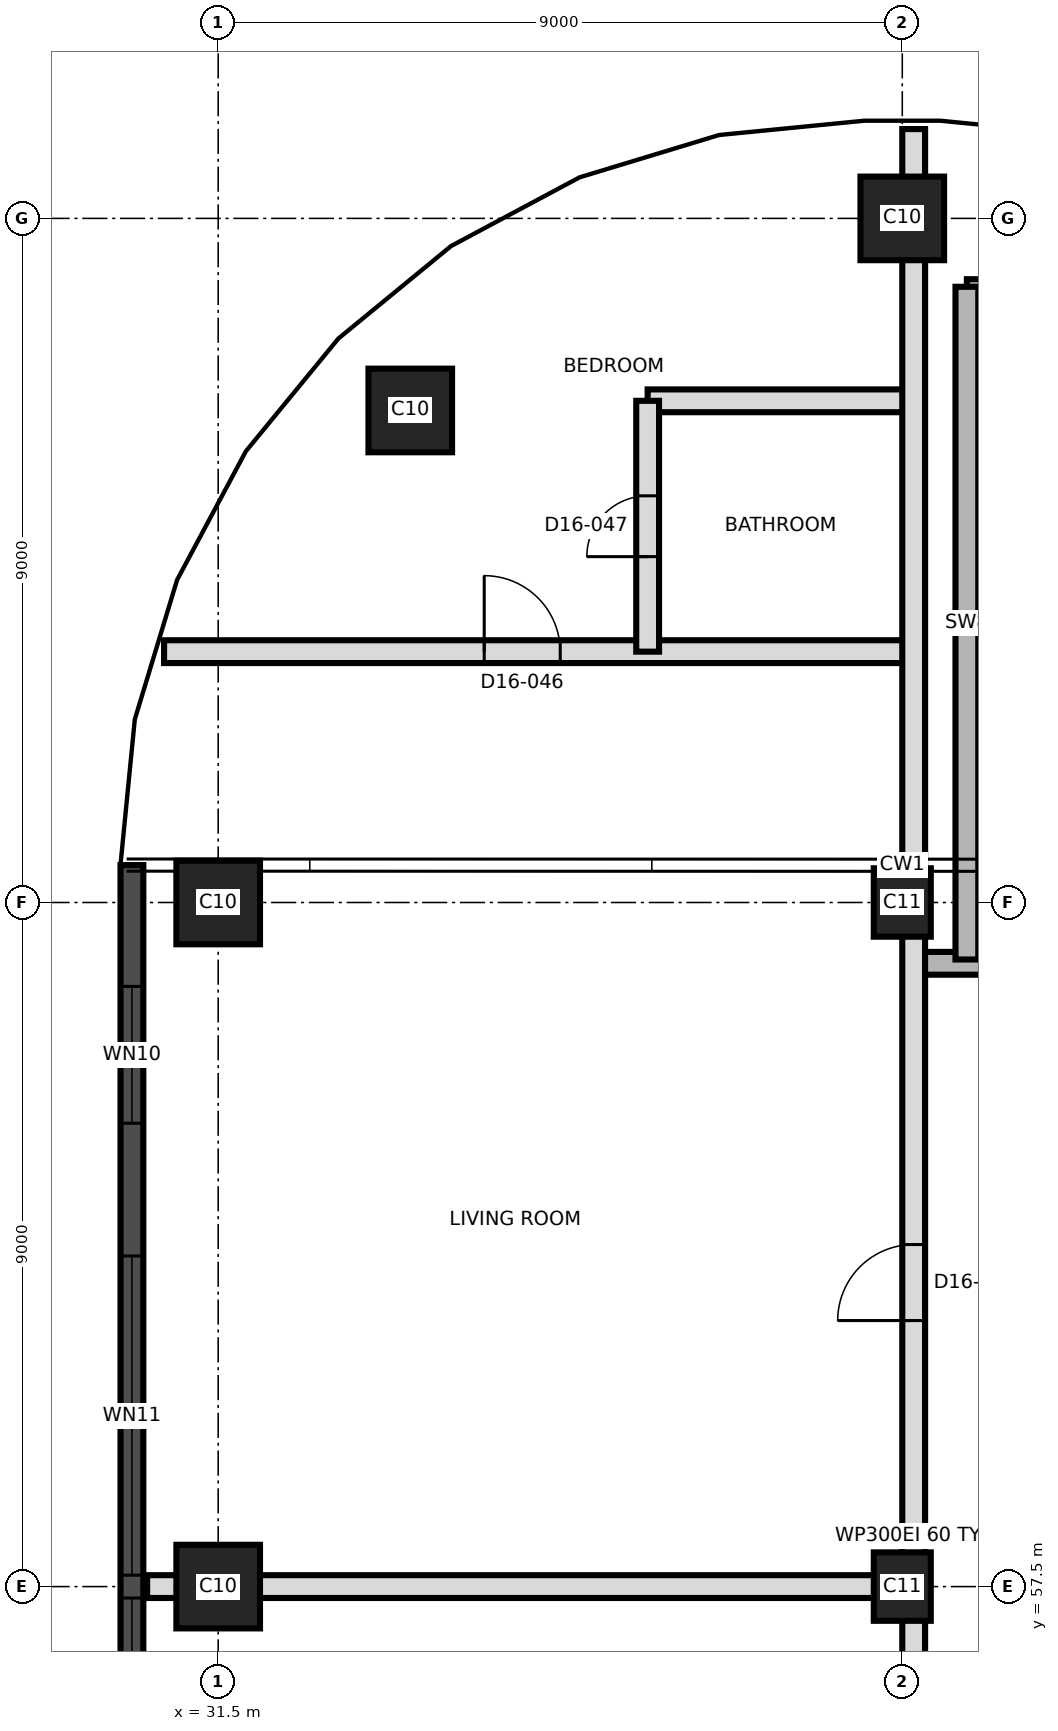
"""IFC4 building model, lengths in metres.
Left out: names, types, materials, properties, quantities, classifications, styles, units other than length and angle.
Written with IfcOpenShell. Run it as: python <this file> out.ifc"""

import sys

from ifc_helpers import new_model, si_unit, direction, frame, frame_2d, origin, origin_2d, place, context, subcontext, project, spatial, rectangle, extrude, element, fill, save


model = new_model("IFC4")
c1 = context("Model", 3, precision=1e-05, world=origin(), true_north=direction((0.0, 1.0)))
c2 = subcontext(c1, "Body", "Model", "MODEL_VIEW")
j1 = project(units=[si_unit("LENGTHUNIT", "METRE"), si_unit("PLANEANGLEUNIT", "RADIAN")], contexts=[c1])
p1 = place(None, origin())
s1 = spatial("IfcSite", under=j1, at=p1, CompositionType="ELEMENT")
p2 = place(p1, origin())
s2 = spatial("IfcBuilding", under=s1, at=p2, CompositionType="ELEMENT")
p3 = place(p2, frame((0.0, 0.0, 168.1)))
s3 = spatial("IfcBuildingStorey", under=s2, at=p3, CompositionType="ELEMENT", Elevation=168.1)
p4 = place(p3, frame((31.5, 57.5, 0.0), z_axis=(0.0, 0.0, 1.0), x_axis=(1.0, 0.0, 0.0)))
e1 = element("IfcColumn", 1, at=p4, inside=s3, PredefinedType="COLUMN", context=c2, shape_type="SweptSolid", body=[
    extrude(rectangle(XDim=1.1, YDim=1.1, at=origin_2d()), origin(), (0.0, 0.0, 1.0), 3.7),
])
p5 = place(p3, frame((40.5, 57.5, 0.0), z_axis=(0.0, 0.0, 1.0), x_axis=(0.0, 1.0, 0.0)))
e2 = element("IfcColumn", 2, at=p5, inside=s3, PredefinedType="COLUMN", context=c2, shape_type="SweptSolid", body=[
    extrude(rectangle(XDim=0.9, YDim=0.75, at=origin_2d()), origin(), (0.0, 0.0, 1.0), 3.7),
])
p6 = place(p3, frame((31.5, 66.5, 0.0), z_axis=(0.0, 0.0, 1.0), x_axis=(1.0, 0.0, 0.0)))
e3 = element("IfcColumn", 3, at=p6, inside=s3, PredefinedType="COLUMN", context=c2, shape_type="SweptSolid", body=[
    extrude(rectangle(XDim=1.1, YDim=1.1, at=origin_2d()), origin(), (0.0, 0.0, 1.0), 3.7),
])
p7 = place(p3, frame((40.5, 66.5, 0.0), z_axis=(0.0, 0.0, 1.0), x_axis=(0.0, 1.0, 0.0)))
e4 = element("IfcColumn", 4, at=p7, inside=s3, PredefinedType="COLUMN", context=c2, shape_type="SweptSolid", body=[
    extrude(rectangle(XDim=0.9, YDim=0.75, at=origin_2d()), origin(), (0.0, 0.0, 1.0), 3.7),
])
for number, where, z_axis, x_axis in (
    (5, (34.027, 72.973, 0.0), (0.0, 0.0, 1.0), (1.0, 0.0, 0.0)),
    (6, (40.5, 75.5, 0.0), (0.0, 0.0, 1.0), (1.0, 0.0, 0.0)),
):
    element("IfcColumn", number, at=place(p3, frame(where, z_axis=z_axis, x_axis=x_axis)), inside=s3, PredefinedType="COLUMN", context=c2, shape_type="SweptSolid", body=[
        extrude(rectangle(XDim=1.1, YDim=1.1, at=origin_2d()), origin(), (0.0, 0.0, 1.0), 3.7),
    ])
p8 = place(p3, frame((30.365, 66.992, 0.0), z_axis=(0.0, 0.0, 1.0), x_axis=(0.0, -1.0, 0.0)))
e7 = element("IfcWall", 7, at=p8, inside=s3, PredefinedType="SOLIDWALL", context=c2, shape_type="SweptSolid", body=[
    extrude(rectangle(XDim=32.981, YDim=0.3, at=frame_2d((16.491, 0.0))), origin(), (0.0, 0.0, 1.0), 3.4),
])
p9 = place(p8, frame((1.596, 0.0, 0.3)))
e8 = element("IfcOpeningElement", 8, at=p9, cuts=e7, PredefinedType="OPENING", context=c2, shape_type="SweptSolid", body=[
    extrude(rectangle(XDim=1.8, YDim=2.4, at=frame_2d((0.9, 1.2))), frame((0.0, 0.16, 0.0), z_axis=(0.0, -1.0, 0.0), x_axis=(1.0, 0.0, 0.0)), (0.0, 0.0, 1.0), 0.32),
])
p10 = place(p8, frame((5.142, 0.0, 0.9)))
e9 = element("IfcOpeningElement", 9, at=p10, cuts=e7, PredefinedType="OPENING", context=c2, shape_type="SweptSolid", body=[
    extrude(rectangle(XDim=4.2, YDim=1.5, at=frame_2d((2.1, 0.75))), frame((0.0, 0.16, 0.0), z_axis=(0.0, -1.0, 0.0), x_axis=(1.0, 0.0, 0.0)), (0.0, 0.0, 1.0), 0.32),
])
p11 = place(p8, frame((9.642, 0.0, 0.9)))
e10 = element("IfcOpeningElement", 10, at=p11, cuts=e7, PredefinedType="OPENING", context=c2, shape_type="SweptSolid", body=[
    extrude(rectangle(XDim=4.2, YDim=1.5, at=frame_2d((2.1, 0.75))), frame((0.0, 0.16, 0.0), z_axis=(0.0, -1.0, 0.0), x_axis=(1.0, 0.0, 0.0)), (0.0, 0.0, 1.0), 0.32),
])
p12 = place(p8, frame((14.142, 0.0, 0.9)))
e11 = element("IfcOpeningElement", 11, at=p12, cuts=e7, PredefinedType="OPENING", context=c2, shape_type="SweptSolid", body=[
    extrude(rectangle(XDim=4.2, YDim=1.5, at=frame_2d((2.1, 0.75))), frame((0.0, 0.16, 0.0), z_axis=(0.0, -1.0, 0.0), x_axis=(1.0, 0.0, 0.0)), (0.0, 0.0, 1.0), 0.32),
])
p13 = place(p8, frame((18.642, 0.0, 0.9)))
e12 = element("IfcOpeningElement", 12, at=p13, cuts=e7, PredefinedType="OPENING", context=c2, shape_type="SweptSolid", body=[
    extrude(rectangle(XDim=4.2, YDim=1.5, at=frame_2d((2.1, 0.75))), frame((0.0, 0.16, 0.0), z_axis=(0.0, -1.0, 0.0), x_axis=(1.0, 0.0, 0.0)), (0.0, 0.0, 1.0), 0.32),
])
p14 = place(p8, frame((23.142, 0.0, 0.9)))
e13 = element("IfcOpeningElement", 13, at=p14, cuts=e7, PredefinedType="OPENING", context=c2, shape_type="SweptSolid", body=[
    extrude(rectangle(XDim=4.2, YDim=1.5, at=frame_2d((2.1, 0.75))), frame((0.0, 0.16, 0.0), z_axis=(0.0, -1.0, 0.0), x_axis=(1.0, 0.0, 0.0)), (0.0, 0.0, 1.0), 0.32),
])
p15 = place(p8, frame((29.337, 0.0, 0.3)))
e14 = element("IfcOpeningElement", 14, at=p15, cuts=e7, PredefinedType="OPENING", context=c2, shape_type="SweptSolid", body=[
    extrude(rectangle(XDim=1.8, YDim=2.4, at=frame_2d((0.9, 1.2))), frame((0.0, 0.16, 0.0), z_axis=(0.0, -1.0, 0.0), x_axis=(1.0, 0.0, 0.0)), (0.0, 0.0, 1.0), 0.32),
])
p16 = place(p3, frame((30.565, 57.5, 0.0), z_axis=(0.0, 0.0, 1.0), x_axis=(1.0, 0.0, 0.0)))
e15 = element("IfcWall", 15, at=p16, inside=s3, PredefinedType="PARTITIONING", context=c2, shape_type="SweptSolid", body=[
    extrude(rectangle(XDim=10.085, YDim=0.3, at=frame_2d((5.042, 0.0))), origin(), (0.0, 0.0, 1.0), 3.4),
])
p17 = place(p3, frame((40.65, 65.7, 0.0), z_axis=(0.0, 0.0, 1.0), x_axis=(1.0, 0.0, 0.0)))
e16 = element("IfcWall", 16, at=p17, inside=s3, PredefinedType="SHEAR", context=c2, shape_type="SweptSolid", body=[
    extrude(rectangle(XDim=6.2, YDim=0.3, at=frame_2d((3.1, 0.0))), origin(), (0.0, 0.0, 1.0), 3.4),
])
p18 = place(p17, frame((1.1, 0.0, 0.0)))
e17 = element("IfcOpeningElement", 17, at=p18, cuts=e16, PredefinedType="OPENING", context=c2, shape_type="SweptSolid", body=[
    extrude(rectangle(XDim=1.2, YDim=2.1, at=frame_2d((0.6, 1.05))), frame((0.0, 0.16, 0.0), z_axis=(0.0, -1.0, 0.0), x_axis=(1.0, 0.0, 0.0)), (0.0, 0.0, 1.0), 0.32),
])
p19 = place(p3, frame((30.788, 69.8, 0.0), z_axis=(0.0, 0.0, 1.0), x_axis=(1.0, 0.0, 0.0)))
e18 = element("IfcWall", 18, at=p19, inside=s3, PredefinedType="PARTITIONING", context=c2, shape_type="SweptSolid", body=[
    extrude(rectangle(XDim=9.862, YDim=0.3, at=frame_2d((4.931, 0.0))), origin(), (0.0, 0.0, 1.0), 3.4),
])
p20 = place(p19, frame((4.212, 0.0, 0.0)))
e19 = element("IfcOpeningElement", 19, at=p20, cuts=e18, PredefinedType="OPENING", context=c2, shape_type="SweptSolid", body=[
    extrude(rectangle(XDim=1.0, YDim=2.1, at=frame_2d((0.5, 1.05))), frame((0.0, 0.16, 0.0), z_axis=(0.0, -1.0, 0.0), x_axis=(1.0, 0.0, 0.0)), (0.0, 0.0, 1.0), 0.32),
])
p21 = place(p3, frame((37.15, 73.1, 0.0), z_axis=(0.0, 0.0, 1.0), x_axis=(1.0, 0.0, 0.0)))
e20 = element("IfcWall", 20, at=p21, inside=s3, PredefinedType="PARTITIONING", context=c2, shape_type="SweptSolid", body=[
    extrude(rectangle(XDim=3.5, YDim=0.3, at=frame_2d((1.75, 0.0))), origin(), (0.0, 0.0, 1.0), 3.4),
])
p22 = place(p3, frame((41.35, 74.55, 0.0), z_axis=(0.0, 0.0, 1.0), x_axis=(1.0, 0.0, 0.0)))
e21 = element("IfcWall", 21, at=p22, inside=s3, PredefinedType="SHEAR", context=c2, shape_type="SweptSolid", body=[
    extrude(rectangle(XDim=3.0, YDim=0.3, at=frame_2d((1.5, 0.0))), origin(), (0.0, 0.0, 1.0), 3.4),
])
p23 = place(p3, frame((37.15, 69.8, 0.0), z_axis=(0.0, 0.0, 1.0), x_axis=(0.0, 1.0, 0.0)))
e22 = element("IfcWall", 22, at=p23, inside=s3, PredefinedType="PARTITIONING", context=c2, shape_type="SweptSolid", body=[
    extrude(rectangle(XDim=3.3, YDim=0.3, at=frame_2d((1.65, 0.0))), origin(), (0.0, 0.0, 1.0), 3.4),
])
p24 = place(p23, frame((1.25, 0.0, 0.0)))
e23 = element("IfcOpeningElement", 23, at=p24, cuts=e22, PredefinedType="OPENING", context=c2, shape_type="SweptSolid", body=[
    extrude(rectangle(XDim=0.8, YDim=2.1, at=frame_2d((0.4, 1.05))), frame((0.0, 0.16, 0.0), z_axis=(0.0, -1.0, 0.0), x_axis=(1.0, 0.0, 0.0)), (0.0, 0.0, 1.0), 0.32),
])
p25 = place(p3, frame((40.65, 39.65, 0.0), z_axis=(0.0, 0.0, 1.0), x_axis=(0.0, 1.0, 0.0)))
e24 = element("IfcWall", 24, at=p25, inside=s3, PredefinedType="PARTITIONING", context=c2, shape_type="SweptSolid", body=[
    extrude(rectangle(XDim=37.025, YDim=0.3, at=frame_2d((18.513, 0.0))), origin(), (0.0, 0.0, 1.0), 3.4),
])
p26 = place(p25, frame((1.0, 0.0, 0.0)))
e25 = element("IfcOpeningElement", 25, at=p26, cuts=e24, PredefinedType="OPENING", context=c2, shape_type="SweptSolid", body=[
    extrude(rectangle(XDim=1.0, YDim=2.1, at=frame_2d((0.5, 1.05))), frame((0.0, 0.16, 0.0), z_axis=(0.0, -1.0, 0.0), x_axis=(1.0, 0.0, 0.0)), (0.0, 0.0, 1.0), 0.32),
])
p27 = place(p25, frame((6.85, 0.0, 0.0)))
e26 = element("IfcOpeningElement", 26, at=p27, cuts=e24, PredefinedType="OPENING", context=c2, shape_type="SweptSolid", body=[
    extrude(rectangle(XDim=1.0, YDim=2.1, at=frame_2d((0.5, 1.05))), frame((0.0, 0.16, 0.0), z_axis=(0.0, -1.0, 0.0), x_axis=(1.0, 0.0, 0.0)), (0.0, 0.0, 1.0), 0.32),
])
p28 = place(p25, frame((14.5, 0.0, 0.0)))
e27 = element("IfcOpeningElement", 27, at=p28, cuts=e24, PredefinedType="OPENING", context=c2, shape_type="SweptSolid", body=[
    extrude(rectangle(XDim=1.0, YDim=2.4, at=frame_2d((0.5, 1.2))), frame((0.0, 0.16, 0.0), z_axis=(0.0, -1.0, 0.0), x_axis=(1.0, 0.0, 0.0)), (0.0, 0.0, 1.0), 0.32),
])
p29 = place(p25, frame((21.35, 0.0, 0.0)))
e28 = element("IfcOpeningElement", 28, at=p29, cuts=e24, PredefinedType="OPENING", context=c2, shape_type="SweptSolid", body=[
    extrude(rectangle(XDim=1.0, YDim=2.4, at=frame_2d((0.5, 1.2))), frame((0.0, 0.16, 0.0), z_axis=(0.0, -1.0, 0.0), x_axis=(1.0, 0.0, 0.0)), (0.0, 0.0, 1.0), 0.32),
])
p30 = place(p3, frame((41.35, 65.75, 0.0), z_axis=(0.0, 0.0, 1.0), x_axis=(0.0, 1.0, 0.0)))
e29 = element("IfcWall", 29, at=p30, inside=s3, PredefinedType="SHEAR", context=c2, shape_type="SweptSolid", body=[
    extrude(rectangle(XDim=8.85, YDim=0.3, at=frame_2d((4.425, 0.0))), origin(), (0.0, 0.0, 1.0), 3.4),
])
p31 = place(p9, origin())
e30 = element("IfcWindow", 30, at=p31, inside=s3, PartitioningType="SINGLE_PANEL", PredefinedType="WINDOW", context=c2, shape_type="SweptSolid", body=[
    extrude(rectangle(XDim=1.8, YDim=2.4, at=frame_2d((0.9, 1.2))), frame((0.0, 0.03, 0.0), z_axis=(0.0, -1.0, 0.0), x_axis=(1.0, 0.0, 0.0)), (0.0, 0.0, 1.0), 0.06),
])
fill(e8, e30)
p32 = place(p10, origin())
e31 = element("IfcWindow", 31, at=p32, inside=s3, PartitioningType="SINGLE_PANEL", PredefinedType="WINDOW", context=c2, shape_type="SweptSolid", body=[
    extrude(rectangle(XDim=4.2, YDim=1.5, at=frame_2d((2.1, 0.75))), frame((0.0, 0.03, 0.0), z_axis=(0.0, -1.0, 0.0), x_axis=(1.0, 0.0, 0.0)), (0.0, 0.0, 1.0), 0.06),
])
fill(e9, e31)
p33 = place(p11, origin())
e32 = element("IfcWindow", 32, at=p33, inside=s3, PartitioningType="SINGLE_PANEL", PredefinedType="WINDOW", context=c2, shape_type="SweptSolid", body=[
    extrude(rectangle(XDim=4.2, YDim=1.5, at=frame_2d((2.1, 0.75))), frame((0.0, 0.03, 0.0), z_axis=(0.0, -1.0, 0.0), x_axis=(1.0, 0.0, 0.0)), (0.0, 0.0, 1.0), 0.06),
])
fill(e10, e32)
p34 = place(p29, origin())
e33 = element("IfcDoor", 33, at=p34, inside=s3, OperationType="SINGLE_SWING_LEFT", PredefinedType="DOOR", context=c2, shape_type="SweptSolid", body=[
    extrude(rectangle(XDim=1.0, YDim=2.4, at=frame_2d((0.5, 1.2))), frame((0.0, 0.025, 0.0), z_axis=(0.0, -1.0, 0.0), x_axis=(1.0, 0.0, 0.0)), (0.0, 0.0, 1.0), 0.05),
])
fill(e28, e33)
p35 = place(p20, origin())
e34 = element("IfcDoor", 34, at=p35, inside=s3, OperationType="SINGLE_SWING_RIGHT", PredefinedType="DOOR", context=c2, shape_type="SweptSolid", body=[
    extrude(rectangle(XDim=1.0, YDim=2.1, at=frame_2d((0.5, 1.05))), frame((0.0, 0.025, 0.0), z_axis=(0.0, -1.0, 0.0), x_axis=(1.0, 0.0, 0.0)), (0.0, 0.0, 1.0), 0.05),
])
fill(e19, e34)
p36 = place(p24, origin())
e35 = element("IfcDoor", 35, at=p36, inside=s3, OperationType="SINGLE_SWING_LEFT", PredefinedType="DOOR", context=c2, shape_type="SweptSolid", body=[
    extrude(rectangle(XDim=0.8, YDim=2.1, at=frame_2d((0.4, 1.05))), frame((0.0, 0.025, 0.0), z_axis=(0.0, -1.0, 0.0), x_axis=(1.0, 0.0, 0.0)), (0.0, 0.0, 1.0), 0.05),
])
fill(e23, e35)
save(model, sys.argv[1])
